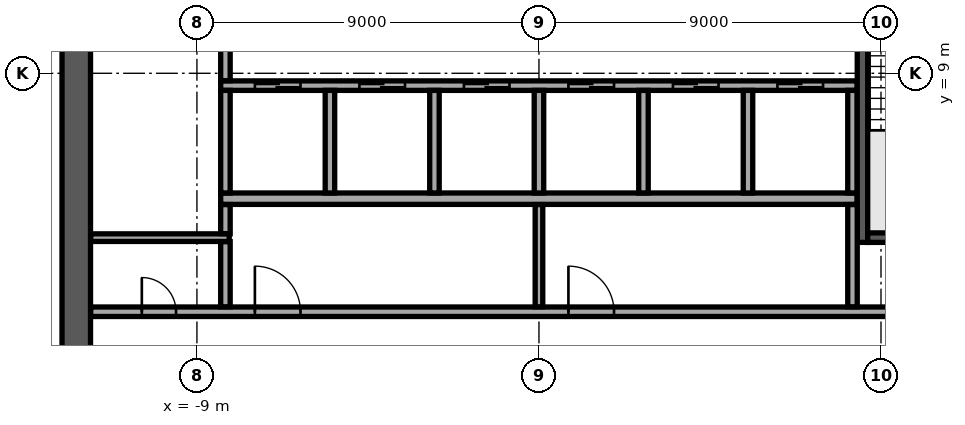
"""IFC4 building model, lengths in metres.
Left out: names, types, materials, properties, quantities, classifications, styles, units other than length and angle.
Written with IfcOpenShell. Run it as: python <this file> out.ifc"""

import sys

from ifc_helpers import new_model, si_unit, direction, frame, frame_2d, origin, place, context, subcontext, project, spatial, rectangle, extrude, element, fill, save


model = new_model("IFC4")
c1 = context("Model", 3, precision=1e-05, world=origin(), true_north=direction((0.0, 1.0)))
c2 = subcontext(c1, "Body", "Model", "MODEL_VIEW")
j1 = project(units=[si_unit("LENGTHUNIT", "METRE"), si_unit("PLANEANGLEUNIT", "RADIAN")], contexts=[c1])
p1 = place(None, origin())
s1 = spatial("IfcSite", under=j1, at=p1, CompositionType="ELEMENT")
p2 = place(p1, origin())
s2 = spatial("IfcBuilding", under=s1, at=p2, CompositionType="ELEMENT")
p3 = place(p2, frame((0.0, 0.0, 254.9)))
s3 = spatial("IfcBuildingStorey", under=s2, at=p3, CompositionType="ELEMENT", Elevation=254.9)
p4 = place(p3, frame((-12.175, -11.8, 0.0), z_axis=(0.0, 0.0, 1.0), x_axis=(0.0, 1.0, 0.0)))
e1 = element("IfcWall", 1, at=p4, inside=s3, PredefinedType="SHEAR", context=c2, shape_type="SweptSolid", body=[
    extrude(rectangle(XDim=23.6, YDim=0.75, at=frame_2d((11.8, 0.0))), origin(), (0.0, 0.0, 1.0), 3.64),
])
p5 = place(p4, frame((10.6, 0.0, 0.0)))
e2 = element("IfcOpeningElement", 2, at=p5, cuts=e1, PredefinedType="OPENING", context=c2, shape_type="SweptSolid", body=[
    extrude(rectangle(XDim=2.4, YDim=2.4, at=frame_2d((1.2, 1.2))), frame((0.0, 0.385, 0.0), z_axis=(0.0, -1.0, 0.0), x_axis=(1.0, 0.0, 0.0)), (0.0, 0.0, 1.0), 0.77),
])
p6 = place(p3, frame((-8.375, 5.7, 0.0), z_axis=(0.0, 0.0, 1.0), x_axis=(1.0, 0.0, 0.0)))
e3 = element("IfcWall", 3, at=p6, inside=s3, PredefinedType="SOLIDWALL", context=c2, shape_type="SweptSolid", body=[
    extrude(rectangle(XDim=16.75, YDim=0.3, at=frame_2d((8.375, 0.0))), origin(), (0.0, 0.0, 1.0), 3.64),
])
p7 = place(p3, frame((-8.375, 8.675, 0.0), z_axis=(0.0, 0.0, 1.0), x_axis=(1.0, 0.0, 0.0)))
e4 = element("IfcWall", 4, at=p7, inside=s3, PredefinedType="SOLIDWALL", context=c2, shape_type="SweptSolid", body=[
    extrude(rectangle(XDim=16.75, YDim=0.25, at=frame_2d((8.375, 0.0))), origin(), (0.0, 0.0, 1.0), 3.64),
])
p8 = place(p7, frame((0.9, 0.0, 0.0)))
e5 = element("IfcOpeningElement", 5, at=p8, cuts=e4, PredefinedType="OPENING", context=c2, shape_type="SweptSolid", body=[
    extrude(rectangle(XDim=1.2, YDim=2.1, at=frame_2d((0.6, 1.05))), frame((0.0, 0.135, 0.0), z_axis=(0.0, -1.0, 0.0), x_axis=(1.0, 0.0, 0.0)), (0.0, 0.0, 1.0), 0.27),
])
p9 = place(p7, frame((3.65, 0.0, 0.0)))
e6 = element("IfcOpeningElement", 6, at=p9, cuts=e4, PredefinedType="OPENING", context=c2, shape_type="SweptSolid", body=[
    extrude(rectangle(XDim=1.2, YDim=2.1, at=frame_2d((0.6, 1.05))), frame((0.0, 0.135, 0.0), z_axis=(0.0, -1.0, 0.0), x_axis=(1.0, 0.0, 0.0)), (0.0, 0.0, 1.0), 0.27),
])
p10 = place(p7, frame((6.4, 0.0, 0.0)))
e7 = element("IfcOpeningElement", 7, at=p10, cuts=e4, PredefinedType="OPENING", context=c2, shape_type="SweptSolid", body=[
    extrude(rectangle(XDim=1.2, YDim=2.1, at=frame_2d((0.6, 1.05))), frame((0.0, 0.135, 0.0), z_axis=(0.0, -1.0, 0.0), x_axis=(1.0, 0.0, 0.0)), (0.0, 0.0, 1.0), 0.27),
])
p11 = place(p7, frame((9.15, 0.0, 0.0)))
e8 = element("IfcOpeningElement", 8, at=p11, cuts=e4, PredefinedType="OPENING", context=c2, shape_type="SweptSolid", body=[
    extrude(rectangle(XDim=1.2, YDim=2.1, at=frame_2d((0.6, 1.05))), frame((0.0, 0.135, 0.0), z_axis=(0.0, -1.0, 0.0), x_axis=(1.0, 0.0, 0.0)), (0.0, 0.0, 1.0), 0.27),
])
p12 = place(p7, frame((11.9, 0.0, 0.0)))
e9 = element("IfcOpeningElement", 9, at=p12, cuts=e4, PredefinedType="OPENING", context=c2, shape_type="SweptSolid", body=[
    extrude(rectangle(XDim=1.2, YDim=2.1, at=frame_2d((0.6, 1.05))), frame((0.0, 0.135, 0.0), z_axis=(0.0, -1.0, 0.0), x_axis=(1.0, 0.0, 0.0)), (0.0, 0.0, 1.0), 0.27),
])
p13 = place(p7, frame((14.65, 0.0, 0.0)))
e10 = element("IfcOpeningElement", 10, at=p13, cuts=e4, PredefinedType="OPENING", context=c2, shape_type="SweptSolid", body=[
    extrude(rectangle(XDim=1.2, YDim=2.1, at=frame_2d((0.6, 1.05))), frame((0.0, 0.135, 0.0), z_axis=(0.0, -1.0, 0.0), x_axis=(1.0, 0.0, 0.0)), (0.0, 0.0, 1.0), 0.27),
])
for number, where, z_axis, x_axis in (
    (11, (-8.25, 5.85, 0.0), (0.0, 0.0, 1.0), (0.0, 1.0, 0.0)),
    (12, (-5.5, 5.85, 0.0), (0.0, 0.0, 1.0), (0.0, 1.0, 0.0)),
    (13, (-2.75, 5.85, 0.0), (0.0, 0.0, 1.0), (0.0, 1.0, 0.0)),
    (14, (0.0, 5.85, 0.0), (0.0, 0.0, 1.0), (0.0, 1.0, 0.0)),
    (15, (2.75, 5.85, 0.0), (0.0, 0.0, 1.0), (0.0, 1.0, 0.0)),
    (16, (5.5, 5.85, 0.0), (0.0, 0.0, 1.0), (0.0, 1.0, 0.0)),
    (17, (8.25, 5.85, 0.0), (0.0, 0.0, 1.0), (0.0, 1.0, 0.0)),
):
    element("IfcWall", number, at=place(p3, frame(where, z_axis=z_axis, x_axis=x_axis)), inside=s3, PredefinedType="SOLIDWALL", context=c2, shape_type="SweptSolid", body=[
        extrude(rectangle(XDim=2.7, YDim=0.25, at=frame_2d((1.35, 0.0))), origin(), (0.0, 0.0, 1.0), 3.64),
    ])
p14 = place(p3, frame((8.512, 4.55, 0.0), z_axis=(0.0, 0.0, 1.0), x_axis=(0.0, 1.0, 0.0)))
e18 = element("IfcWall", 18, at=p14, inside=s3, PredefinedType="SOLIDWALL", context=c2, shape_type="SweptSolid", body=[
    extrude(rectangle(XDim=7.25, YDim=0.275, at=frame_2d((3.625, 0.0))), origin(), (0.0, 0.0, 1.0), 3.64),
])
p15 = place(p14, frame((6.0, 0.0, 0.0)))
e19 = element("IfcOpeningElement", 19, at=p15, cuts=e18, PredefinedType="OPENING", context=c2, shape_type="SweptSolid", body=[
    extrude(rectangle(XDim=1.0, YDim=2.1, at=frame_2d((0.5, 1.05))), frame((0.0, 0.147, 0.0), z_axis=(0.0, -1.0, 0.0), x_axis=(1.0, 0.0, 0.0)), (0.0, 0.0, 1.0), 0.295),
])
p16 = place(p3, frame((8.65, 4.675, 0.0), z_axis=(0.0, 0.0, 1.0), x_axis=(1.0, 0.0, 0.0)))
e20 = element("IfcWall", 20, at=p16, inside=s3, PredefinedType="SOLIDWALL", context=c2, shape_type="SweptSolid", body=[
    extrude(rectangle(XDim=3.15, YDim=0.25, at=frame_2d((1.575, 0.0))), origin(), (0.0, 0.0, 1.0), 3.64),
])
p17 = place(p3, frame((-11.795, 2.725, 0.0), z_axis=(0.0, 0.0, 1.0), x_axis=(1.0, 0.0, 0.0)))
e21 = element("IfcWall", 21, at=p17, inside=s3, PredefinedType="PARTITIONING", context=c2, shape_type="SweptSolid", body=[
    extrude(rectangle(XDim=23.59, YDim=0.25, at=frame_2d((11.795, 0.0))), origin(), (0.0, 0.0, 1.0), 3.64),
])
p18 = place(p17, frame((21.345, 0.0, 0.0)))
e22 = element("IfcOpeningElement", 22, at=p18, cuts=e21, PredefinedType="OPENING", context=c2, shape_type="SweptSolid", body=[
    extrude(rectangle(XDim=0.9, YDim=2.1, at=frame_2d((0.45, 1.05))), frame((0.0, 0.135, 0.0), z_axis=(0.0, -1.0, 0.0), x_axis=(1.0, 0.0, 0.0)), (0.0, 0.0, 1.0), 0.27),
])
p19 = place(p17, frame((1.345, 0.0, 0.0)))
e23 = element("IfcOpeningElement", 23, at=p19, cuts=e21, PredefinedType="OPENING", context=c2, shape_type="SweptSolid", body=[
    extrude(rectangle(XDim=0.9, YDim=2.1, at=frame_2d((0.45, 1.05))), frame((0.0, 0.135, 0.0), z_axis=(0.0, -1.0, 0.0), x_axis=(1.0, 0.0, 0.0)), (0.0, 0.0, 1.0), 0.27),
])
p20 = place(p17, frame((4.32, 0.0, 0.0)))
e24 = element("IfcOpeningElement", 24, at=p20, cuts=e21, PredefinedType="OPENING", context=c2, shape_type="SweptSolid", body=[
    extrude(rectangle(XDim=1.2, YDim=2.1, at=frame_2d((0.6, 1.05))), frame((0.0, 0.135, 0.0), z_axis=(0.0, -1.0, 0.0), x_axis=(1.0, 0.0, 0.0)), (0.0, 0.0, 1.0), 0.27),
])
p21 = place(p17, frame((12.57, 0.0, 0.0)))
e25 = element("IfcOpeningElement", 25, at=p21, cuts=e21, PredefinedType="OPENING", context=c2, shape_type="SweptSolid", body=[
    extrude(rectangle(XDim=1.2, YDim=2.1, at=frame_2d((0.6, 1.05))), frame((0.0, 0.135, 0.0), z_axis=(0.0, -1.0, 0.0), x_axis=(1.0, 0.0, 0.0)), (0.0, 0.0, 1.0), 0.27),
])
p22 = place(p3, frame((-8.25, 2.855, 0.0), z_axis=(0.0, 0.0, 1.0), x_axis=(0.0, 1.0, 0.0)))
e26 = element("IfcWall", 26, at=p22, inside=s3, PredefinedType="PARTITIONING", context=c2, shape_type="SweptSolid", body=[
    extrude(rectangle(XDim=1.715, YDim=0.25, at=frame_2d((0.857, 0.0))), origin(), (0.0, 0.0, 1.0), 3.64),
])
p23 = place(p3, frame((0.0, 2.855, 0.0), z_axis=(0.0, 0.0, 1.0), x_axis=(0.0, 1.0, 0.0)))
e27 = element("IfcWall", 27, at=p23, inside=s3, PredefinedType="PARTITIONING", context=c2, shape_type="SweptSolid", body=[
    extrude(rectangle(XDim=2.69, YDim=0.2, at=frame_2d((1.345, 0.0))), origin(), (0.0, 0.0, 1.0), 3.64),
])
p24 = place(p3, frame((8.25, 2.855, 0.0), z_axis=(0.0, 0.0, 1.0), x_axis=(0.0, 1.0, 0.0)))
e28 = element("IfcWall", 28, at=p24, inside=s3, PredefinedType="PARTITIONING", context=c2, shape_type="SweptSolid", body=[
    extrude(rectangle(XDim=2.69, YDim=0.25, at=frame_2d((1.345, 0.0))), origin(), (0.0, 0.0, 1.0), 3.64),
])
p25 = place(p3, frame((-11.795, 4.675, 0.0), z_axis=(0.0, 0.0, 1.0), x_axis=(1.0, 0.0, 0.0)))
e29 = element("IfcWall", 29, at=p25, inside=s3, PredefinedType="PARTITIONING", context=c2, shape_type="SweptSolid", body=[
    extrude(rectangle(XDim=3.645, YDim=0.2, at=frame_2d((1.823, 0.0))), origin(), (0.0, 0.0, 1.0), 3.64),
])
p26 = place(p3, frame((-8.25, 4.78, 0.0), z_axis=(0.0, 0.0, 1.0), x_axis=(0.0, 1.0, 0.0)))
e30 = element("IfcWall", 30, at=p26, inside=s3, PredefinedType="PARTITIONING", context=c2, shape_type="SweptSolid", body=[
    extrude(rectangle(XDim=0.765, YDim=0.25, at=frame_2d((0.382, 0.0))), origin(), (0.0, 0.0, 1.0), 3.64),
])
p27 = place(p3, frame((-8.25, 8.805, 0.0), z_axis=(0.0, 0.0, 1.0), x_axis=(0.0, 1.0, 0.0)))
e31 = element("IfcWall", 31, at=p27, inside=s3, PredefinedType="PARTITIONING", context=c2, shape_type="SweptSolid", body=[
    extrude(rectangle(XDim=2.99, YDim=0.25, at=frame_2d((1.495, 0.0))), origin(), (0.0, 0.0, 1.0), 3.64),
])
p28 = place(p27, frame((0.895, 0.0, 0.0)))
e32 = element("IfcOpeningElement", 32, at=p28, cuts=e31, PredefinedType="OPENING", context=c2, shape_type="SweptSolid", body=[
    extrude(rectangle(XDim=1.0, YDim=2.1, at=frame_2d((0.5, 1.05))), frame((0.0, 0.135, 0.0), z_axis=(0.0, -1.0, 0.0), x_axis=(1.0, 0.0, 0.0)), (0.0, 0.0, 1.0), 0.27),
])
p29 = place(p3, frame((-6.281, 33.292, 0.0), z_axis=(0.0, 0.0, 1.0), x_axis=(-0.544637268583, -0.838671715077, 0.0)))
e33 = element("IfcWall", 33, at=p29, inside=s3, PredefinedType="STANDARD", context=c2, shape_type="SweptSolid", body=[
    extrude(rectangle(XDim=48.843, YDim=0.6, at=frame_2d((24.422, 0.0))), origin(), (0.0, 0.0, 1.0), 3.64),
])
p30 = place(p29, frame((1.22, 0.0, 0.9)))
e34 = element("IfcOpeningElement", 34, at=p30, cuts=e33, PredefinedType="OPENING", context=c2, shape_type="SweptSolid", body=[
    extrude(rectangle(XDim=2.0, YDim=2.1, at=frame_2d((1.0, 1.05))), frame((0.0, 0.31, 0.0), z_axis=(0.0, -1.0, 0.0), x_axis=(1.0, 0.0, 0.0)), (0.0, 0.0, 1.0), 0.62),
])
p31 = place(p29, frame((5.66, 0.0, 0.9)))
e35 = element("IfcOpeningElement", 35, at=p31, cuts=e33, PredefinedType="OPENING", context=c2, shape_type="SweptSolid", body=[
    extrude(rectangle(XDim=2.0, YDim=2.1, at=frame_2d((1.0, 1.05))), frame((0.0, 0.31, 0.0), z_axis=(0.0, -1.0, 0.0), x_axis=(1.0, 0.0, 0.0)), (0.0, 0.0, 1.0), 0.62),
])
p32 = place(p29, frame((14.541, 0.0, 0.9)))
e36 = element("IfcOpeningElement", 36, at=p32, cuts=e33, PredefinedType="OPENING", context=c2, shape_type="SweptSolid", body=[
    extrude(rectangle(XDim=2.0, YDim=2.1, at=frame_2d((1.0, 1.05))), frame((0.0, 0.31, 0.0), z_axis=(0.0, -1.0, 0.0), x_axis=(1.0, 0.0, 0.0)), (0.0, 0.0, 1.0), 0.62),
])
p33 = place(p29, frame((18.981, 0.0, 0.9)))
e37 = element("IfcOpeningElement", 37, at=p33, cuts=e33, PredefinedType="OPENING", context=c2, shape_type="SweptSolid", body=[
    extrude(rectangle(XDim=2.0, YDim=2.1, at=frame_2d((1.0, 1.05))), frame((0.0, 0.31, 0.0), z_axis=(0.0, -1.0, 0.0), x_axis=(1.0, 0.0, 0.0)), (0.0, 0.0, 1.0), 0.62),
])
p34 = place(p29, frame((23.422, 0.0, 0.9)))
e38 = element("IfcOpeningElement", 38, at=p34, cuts=e33, PredefinedType="OPENING", context=c2, shape_type="SweptSolid", body=[
    extrude(rectangle(XDim=2.0, YDim=2.1, at=frame_2d((1.0, 1.05))), frame((0.0, 0.31, 0.0), z_axis=(0.0, -1.0, 0.0), x_axis=(1.0, 0.0, 0.0)), (0.0, 0.0, 1.0), 0.62),
])
p35 = place(p29, frame((27.862, 0.0, 0.9)))
e39 = element("IfcOpeningElement", 39, at=p35, cuts=e33, PredefinedType="OPENING", context=c2, shape_type="SweptSolid", body=[
    extrude(rectangle(XDim=2.0, YDim=2.1, at=frame_2d((1.0, 1.05))), frame((0.0, 0.31, 0.0), z_axis=(0.0, -1.0, 0.0), x_axis=(1.0, 0.0, 0.0)), (0.0, 0.0, 1.0), 0.62),
])
p36 = place(p29, frame((32.302, 0.0, 0.9)))
e40 = element("IfcOpeningElement", 40, at=p36, cuts=e33, PredefinedType="OPENING", context=c2, shape_type="SweptSolid", body=[
    extrude(rectangle(XDim=2.0, YDim=2.1, at=frame_2d((1.0, 1.05))), frame((0.0, 0.31, 0.0), z_axis=(0.0, -1.0, 0.0), x_axis=(1.0, 0.0, 0.0)), (0.0, 0.0, 1.0), 0.62),
])
p37 = place(p29, frame((36.742, 0.0, 0.9)))
e41 = element("IfcOpeningElement", 41, at=p37, cuts=e33, PredefinedType="OPENING", context=c2, shape_type="SweptSolid", body=[
    extrude(rectangle(XDim=2.0, YDim=2.1, at=frame_2d((1.0, 1.05))), frame((0.0, 0.31, 0.0), z_axis=(0.0, -1.0, 0.0), x_axis=(1.0, 0.0, 0.0)), (0.0, 0.0, 1.0), 0.62),
])
p38 = place(p29, frame((41.183, 0.0, 0.9)))
e42 = element("IfcOpeningElement", 42, at=p38, cuts=e33, PredefinedType="OPENING", context=c2, shape_type="SweptSolid", body=[
    extrude(rectangle(XDim=2.0, YDim=2.1, at=frame_2d((1.0, 1.05))), frame((0.0, 0.31, 0.0), z_axis=(0.0, -1.0, 0.0), x_axis=(1.0, 0.0, 0.0)), (0.0, 0.0, 1.0), 0.62),
])
p39 = place(p29, frame((45.623, 0.0, 0.9)))
e43 = element("IfcOpeningElement", 43, at=p39, cuts=e33, PredefinedType="OPENING", context=c2, shape_type="SweptSolid", body=[
    extrude(rectangle(XDim=2.0, YDim=2.1, at=frame_2d((1.0, 1.05))), frame((0.0, 0.31, 0.0), z_axis=(0.0, -1.0, 0.0), x_axis=(1.0, 0.0, 0.0)), (0.0, 0.0, 1.0), 0.62),
])
p40 = place(p3, frame((6.367, -33.16, 0.0), z_axis=(0.0, 0.0, 1.0), x_axis=(0.544637371147, 0.838671648472, 0.0)))
e44 = element("IfcWall", 44, at=p40, inside=s3, PredefinedType="STANDARD", context=c2, shape_type="SweptSolid", body=[
    extrude(rectangle(XDim=48.686, YDim=0.6, at=frame_2d((24.343, 0.0))), origin(), (0.0, 0.0, 1.0), 3.64),
])
p41 = place(p40, frame((1.213, 0.0, 0.9)))
e45 = element("IfcOpeningElement", 45, at=p41, cuts=e44, PredefinedType="OPENING", context=c2, shape_type="SweptSolid", body=[
    extrude(rectangle(XDim=2.0, YDim=2.1, at=frame_2d((1.0, 1.05))), frame((0.0, 0.31, 0.0), z_axis=(0.0, -1.0, 0.0), x_axis=(1.0, 0.0, 0.0)), (0.0, 0.0, 1.0), 0.62),
])
p42 = place(p40, frame((5.639, 0.0, 0.9)))
e46 = element("IfcOpeningElement", 46, at=p42, cuts=e44, PredefinedType="OPENING", context=c2, shape_type="SweptSolid", body=[
    extrude(rectangle(XDim=2.0, YDim=2.1, at=frame_2d((1.0, 1.05))), frame((0.0, 0.31, 0.0), z_axis=(0.0, -1.0, 0.0), x_axis=(1.0, 0.0, 0.0)), (0.0, 0.0, 1.0), 0.62),
])
p43 = place(p40, frame((14.491, 0.0, 0.9)))
e47 = element("IfcOpeningElement", 47, at=p43, cuts=e44, PredefinedType="OPENING", context=c2, shape_type="SweptSolid", body=[
    extrude(rectangle(XDim=2.0, YDim=2.1, at=frame_2d((1.0, 1.05))), frame((0.0, 0.31, 0.0), z_axis=(0.0, -1.0, 0.0), x_axis=(1.0, 0.0, 0.0)), (0.0, 0.0, 1.0), 0.62),
])
p44 = place(p40, frame((18.917, 0.0, 0.9)))
e48 = element("IfcOpeningElement", 48, at=p44, cuts=e44, PredefinedType="OPENING", context=c2, shape_type="SweptSolid", body=[
    extrude(rectangle(XDim=2.0, YDim=2.1, at=frame_2d((1.0, 1.05))), frame((0.0, 0.31, 0.0), z_axis=(0.0, -1.0, 0.0), x_axis=(1.0, 0.0, 0.0)), (0.0, 0.0, 1.0), 0.62),
])
p45 = place(p40, frame((23.343, 0.0, 0.9)))
e49 = element("IfcOpeningElement", 49, at=p45, cuts=e44, PredefinedType="OPENING", context=c2, shape_type="SweptSolid", body=[
    extrude(rectangle(XDim=2.0, YDim=2.1, at=frame_2d((1.0, 1.05))), frame((0.0, 0.31, 0.0), z_axis=(0.0, -1.0, 0.0), x_axis=(1.0, 0.0, 0.0)), (0.0, 0.0, 1.0), 0.62),
])
p46 = place(p40, frame((27.769, 0.0, 0.9)))
e50 = element("IfcOpeningElement", 50, at=p46, cuts=e44, PredefinedType="OPENING", context=c2, shape_type="SweptSolid", body=[
    extrude(rectangle(XDim=2.0, YDim=2.1, at=frame_2d((1.0, 1.05))), frame((0.0, 0.31, 0.0), z_axis=(0.0, -1.0, 0.0), x_axis=(1.0, 0.0, 0.0)), (0.0, 0.0, 1.0), 0.62),
])
p47 = place(p40, frame((32.195, 0.0, 0.9)))
e51 = element("IfcOpeningElement", 51, at=p47, cuts=e44, PredefinedType="OPENING", context=c2, shape_type="SweptSolid", body=[
    extrude(rectangle(XDim=2.0, YDim=2.1, at=frame_2d((1.0, 1.05))), frame((0.0, 0.31, 0.0), z_axis=(0.0, -1.0, 0.0), x_axis=(1.0, 0.0, 0.0)), (0.0, 0.0, 1.0), 0.62),
])
p48 = place(p40, frame((36.621, 0.0, 0.9)))
e52 = element("IfcOpeningElement", 52, at=p48, cuts=e44, PredefinedType="OPENING", context=c2, shape_type="SweptSolid", body=[
    extrude(rectangle(XDim=2.0, YDim=2.1, at=frame_2d((1.0, 1.05))), frame((0.0, 0.31, 0.0), z_axis=(0.0, -1.0, 0.0), x_axis=(1.0, 0.0, 0.0)), (0.0, 0.0, 1.0), 0.62),
])
p49 = place(p40, frame((41.047, 0.0, 0.9)))
e53 = element("IfcOpeningElement", 53, at=p49, cuts=e44, PredefinedType="OPENING", context=c2, shape_type="SweptSolid", body=[
    extrude(rectangle(XDim=2.0, YDim=2.1, at=frame_2d((1.0, 1.05))), frame((0.0, 0.31, 0.0), z_axis=(0.0, -1.0, 0.0), x_axis=(1.0, 0.0, 0.0)), (0.0, 0.0, 1.0), 0.62),
])
p50 = place(p40, frame((45.473, 0.0, 0.9)))
e54 = element("IfcOpeningElement", 54, at=p50, cuts=e44, PredefinedType="OPENING", context=c2, shape_type="SweptSolid", body=[
    extrude(rectangle(XDim=2.0, YDim=2.1, at=frame_2d((1.0, 1.05))), frame((0.0, 0.31, 0.0), z_axis=(0.0, -1.0, 0.0), x_axis=(1.0, 0.0, 0.0)), (0.0, 0.0, 1.0), 0.62),
])
p51 = place(p3, frame((-6.127, 26.598, 0.0), z_axis=(0.0, 0.0, 1.0), x_axis=(0.838670911559, -0.544638505897, 0.0)))
e55 = element("IfcWall", 55, at=p51, inside=s3, PredefinedType="PARTITIONING", context=c2, shape_type="SweptSolid", body=[
    extrude(rectangle(XDim=39.325, YDim=0.15, at=frame_2d((19.663, 0.0))), origin(), (0.0, 0.0, 1.0), 3.04),
])
p52 = place(p51, frame((9.3, 0.0, 0.0)))
e56 = element("IfcOpeningElement", 56, at=p52, cuts=e55, PredefinedType="OPENING", context=c2, shape_type="SweptSolid", body=[
    extrude(rectangle(XDim=1.8, YDim=2.1, at=frame_2d((0.9, 1.05))), frame((0.0, 0.085, 0.0), z_axis=(0.0, -1.0, 0.0), x_axis=(1.0, 0.0, 0.0)), (0.0, 0.0, 1.0), 0.17),
])
p53 = place(p51, frame((12.185, 0.0, 0.0)))
e57 = element("IfcOpeningElement", 57, at=p53, cuts=e55, PredefinedType="OPENING", context=c2, shape_type="SweptSolid", body=[
    extrude(rectangle(XDim=1.0, YDim=2.1, at=frame_2d((0.5, 1.05))), frame((0.0, 0.085, 0.0), z_axis=(0.0, -1.0, 0.0), x_axis=(1.0, 0.0, 0.0)), (0.0, 0.0, 1.0), 0.17),
])
p54 = place(p51, frame((23.155, 0.0, 0.0)))
e58 = element("IfcOpeningElement", 58, at=p54, cuts=e55, PredefinedType="OPENING", context=c2, shape_type="SweptSolid", body=[
    extrude(rectangle(XDim=1.0, YDim=2.1, at=frame_2d((0.5, 1.05))), frame((0.0, 0.085, 0.0), z_axis=(0.0, -1.0, 0.0), x_axis=(1.0, 0.0, 0.0)), (0.0, 0.0, 1.0), 0.17),
])
p55 = place(p51, frame((30.544, 0.0, 0.0)))
e59 = element("IfcOpeningElement", 59, at=p55, cuts=e55, PredefinedType="OPENING", context=c2, shape_type="SweptSolid", body=[
    extrude(rectangle(XDim=1.0, YDim=2.1, at=frame_2d((0.5, 1.05))), frame((0.0, 0.085, 0.0), z_axis=(0.0, -1.0, 0.0), x_axis=(1.0, 0.0, 0.0)), (0.0, 0.0, 1.0), 0.17),
])
p56 = place(p51, frame((36.099, 0.0, 0.0)))
e60 = element("IfcOpeningElement", 60, at=p56, cuts=e55, PredefinedType="OPENING", context=c2, shape_type="SweptSolid", body=[
    extrude(rectangle(XDim=1.0, YDim=2.1, at=frame_2d((0.5, 1.05))), frame((0.0, 0.085, 0.0), z_axis=(0.0, -1.0, 0.0), x_axis=(1.0, 0.0, 0.0)), (0.0, 0.0, 1.0), 0.17),
])
p57 = place(p8, origin())
e61 = element("IfcDoor", 61, at=p57, inside=s3, OperationType="DOUBLE_DOOR_SLIDING", PredefinedType="DOOR", context=c2, shape_type="SweptSolid", body=[
    extrude(rectangle(XDim=1.2, YDim=2.1, at=frame_2d((0.6, 1.05))), frame((0.0, 0.025, 0.0), z_axis=(0.0, -1.0, 0.0), x_axis=(1.0, 0.0, 0.0)), (0.0, 0.0, 1.0), 0.05),
])
fill(e5, e61)
p58 = place(p9, origin())
e62 = element("IfcDoor", 62, at=p58, inside=s3, OperationType="DOUBLE_DOOR_SLIDING", PredefinedType="DOOR", context=c2, shape_type="SweptSolid", body=[
    extrude(rectangle(XDim=1.2, YDim=2.1, at=frame_2d((0.6, 1.05))), frame((0.0, 0.025, 0.0), z_axis=(0.0, -1.0, 0.0), x_axis=(1.0, 0.0, 0.0)), (0.0, 0.0, 1.0), 0.05),
])
fill(e6, e62)
p59 = place(p10, origin())
e63 = element("IfcDoor", 63, at=p59, inside=s3, OperationType="DOUBLE_DOOR_SLIDING", PredefinedType="DOOR", context=c2, shape_type="SweptSolid", body=[
    extrude(rectangle(XDim=1.2, YDim=2.1, at=frame_2d((0.6, 1.05))), frame((0.0, 0.025, 0.0), z_axis=(0.0, -1.0, 0.0), x_axis=(1.0, 0.0, 0.0)), (0.0, 0.0, 1.0), 0.05),
])
fill(e7, e63)
p60 = place(p11, origin())
e64 = element("IfcDoor", 64, at=p60, inside=s3, OperationType="DOUBLE_DOOR_SLIDING", PredefinedType="DOOR", context=c2, shape_type="SweptSolid", body=[
    extrude(rectangle(XDim=1.2, YDim=2.1, at=frame_2d((0.6, 1.05))), frame((0.0, 0.025, 0.0), z_axis=(0.0, -1.0, 0.0), x_axis=(1.0, 0.0, 0.0)), (0.0, 0.0, 1.0), 0.05),
])
fill(e8, e64)
p61 = place(p12, origin())
e65 = element("IfcDoor", 65, at=p61, inside=s3, OperationType="DOUBLE_DOOR_SLIDING", PredefinedType="DOOR", context=c2, shape_type="SweptSolid", body=[
    extrude(rectangle(XDim=1.2, YDim=2.1, at=frame_2d((0.6, 1.05))), frame((0.0, 0.025, 0.0), z_axis=(0.0, -1.0, 0.0), x_axis=(1.0, 0.0, 0.0)), (0.0, 0.0, 1.0), 0.05),
])
fill(e9, e65)
p62 = place(p13, origin())
e66 = element("IfcDoor", 66, at=p62, inside=s3, OperationType="DOUBLE_DOOR_SLIDING", PredefinedType="DOOR", context=c2, shape_type="SweptSolid", body=[
    extrude(rectangle(XDim=1.2, YDim=2.1, at=frame_2d((0.6, 1.05))), frame((0.0, 0.025, 0.0), z_axis=(0.0, -1.0, 0.0), x_axis=(1.0, 0.0, 0.0)), (0.0, 0.0, 1.0), 0.05),
])
fill(e10, e66)
p63 = place(p19, origin())
e67 = element("IfcDoor", 67, at=p63, inside=s3, OperationType="SINGLE_SWING_LEFT", PredefinedType="DOOR", context=c2, shape_type="SweptSolid", body=[
    extrude(rectangle(XDim=0.9, YDim=2.1, at=frame_2d((0.45, 1.05))), frame((0.0, 0.025, 0.0), z_axis=(0.0, -1.0, 0.0), x_axis=(1.0, 0.0, 0.0)), (0.0, 0.0, 1.0), 0.05),
])
fill(e23, e67)
p64 = place(p20, origin())
e68 = element("IfcDoor", 68, at=p64, inside=s3, OperationType="SINGLE_SWING_LEFT", PredefinedType="DOOR", context=c2, shape_type="SweptSolid", body=[
    extrude(rectangle(XDim=1.2, YDim=2.1, at=frame_2d((0.6, 1.05))), frame((0.0, 0.025, 0.0), z_axis=(0.0, -1.0, 0.0), x_axis=(1.0, 0.0, 0.0)), (0.0, 0.0, 1.0), 0.05),
])
fill(e24, e68)
p65 = place(p21, origin())
e69 = element("IfcDoor", 69, at=p65, inside=s3, OperationType="SINGLE_SWING_LEFT", PredefinedType="DOOR", context=c2, shape_type="SweptSolid", body=[
    extrude(rectangle(XDim=1.2, YDim=2.1, at=frame_2d((0.6, 1.05))), frame((0.0, 0.025, 0.0), z_axis=(0.0, -1.0, 0.0), x_axis=(1.0, 0.0, 0.0)), (0.0, 0.0, 1.0), 0.05),
])
fill(e25, e69)
save(model, sys.argv[1])
